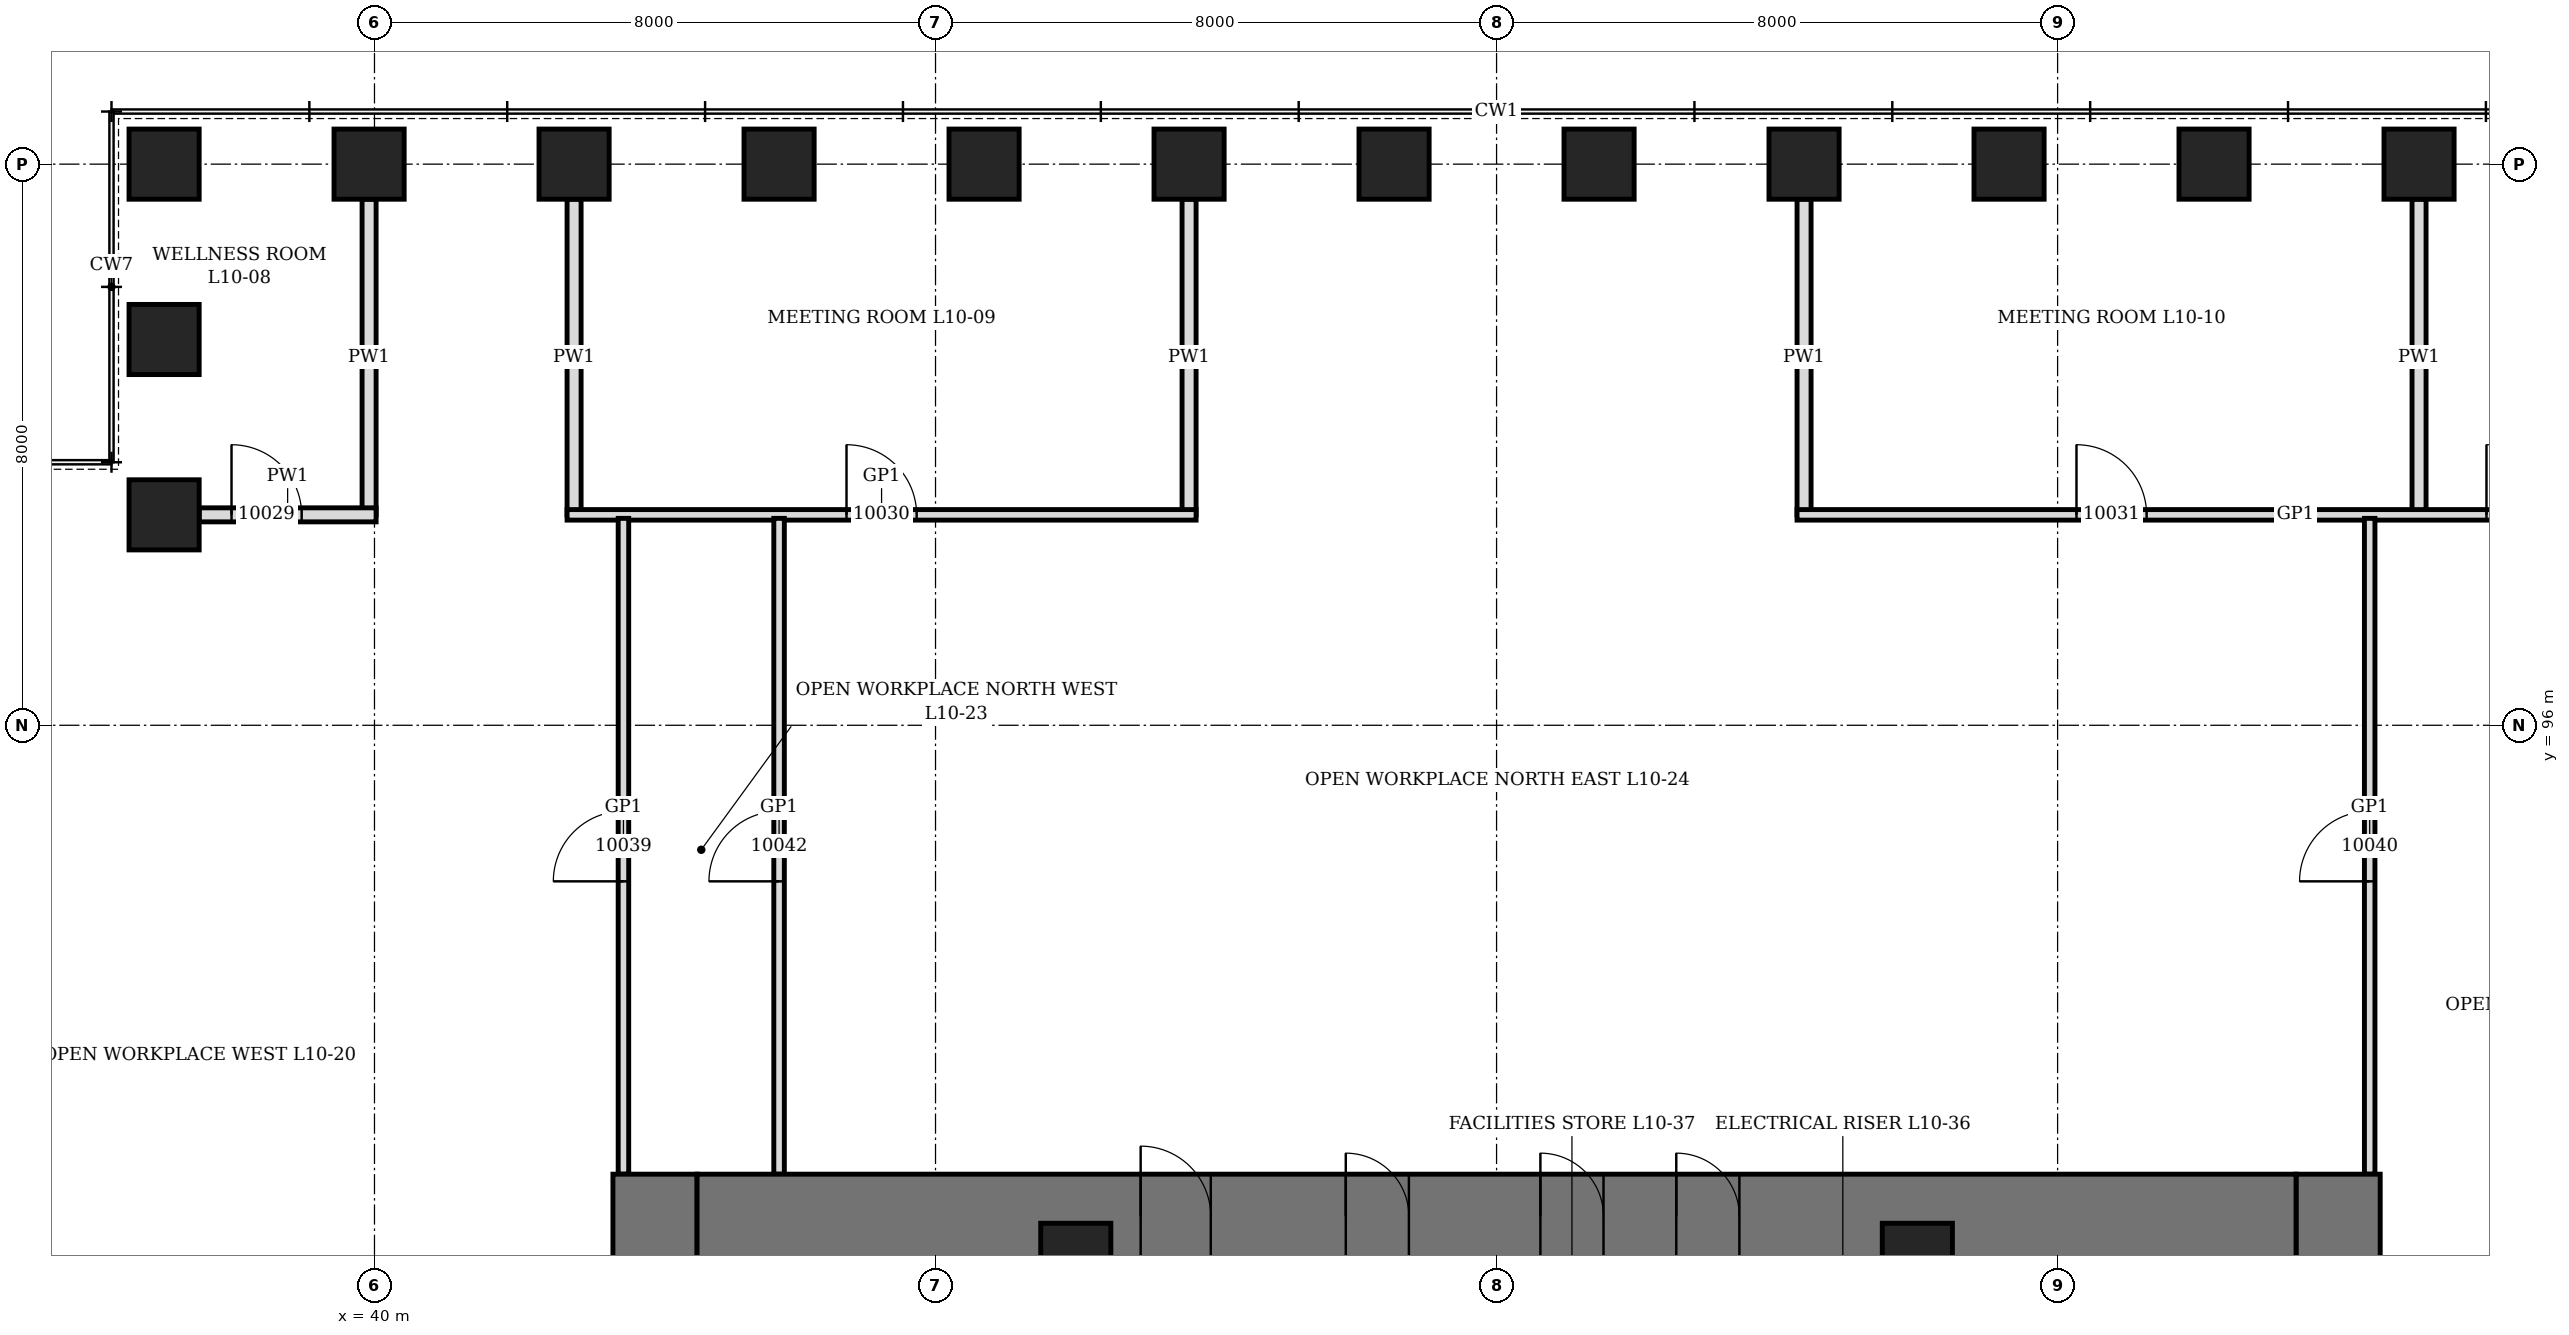
"""IFC4 building model, lengths in metres.
Left out: names, types, materials, properties, quantities, classifications, styles, units other than length and angle.
Written with IfcOpenShell. Run it as: python <this file> out.ifc"""

import sys

from ifc_helpers import new_model, si_unit, direction, frame, frame_2d, origin, origin_2d, place, context, subcontext, project, spatial, rectangle, hollow_rectangle, extrude, element, fill, save


model = new_model("IFC4")
c1 = context("Model", 3, precision=1e-05, world=origin(), true_north=direction((0.0, 1.0)))
c2 = subcontext(c1, "Body", "Model", "MODEL_VIEW")
j1 = project(units=[si_unit("LENGTHUNIT", "METRE"), si_unit("PLANEANGLEUNIT", "RADIAN")], contexts=[c1])
p1 = place(None, origin())
s1 = spatial("IfcSite", under=j1, at=p1, CompositionType="ELEMENT")
p2 = place(p1, origin())
s2 = spatial("IfcBuilding", under=s1, at=p2, CompositionType="ELEMENT")
p3 = place(p2, frame((0.0, 0.0, 51.7)))
s3 = spatial("IfcBuildingStorey", under=s2, at=p3, CompositionType="ELEMENT", Elevation=51.7)
for number, where, z_axis, x_axis in (
    (1, (69.154, 104.0, 0.0), (0.0, 0.0, 1.0), (1.0, 0.0, 0.0)),
    (2, (66.231, 104.0, 0.0), (0.0, 0.0, 1.0), (1.0, 0.0, 0.0)),
    (3, (63.308, 104.0, 0.0), (0.0, 0.0, 1.0), (1.0, 0.0, 0.0)),
    (4, (60.385, 104.0, 0.0), (0.0, 0.0, 1.0), (1.0, 0.0, 0.0)),
    (5, (57.461, 104.0, 0.0), (0.0, 0.0, 1.0), (1.0, 0.0, 0.0)),
    (6, (54.539, 104.0, 0.0), (0.0, 0.0, 1.0), (1.0, 0.0, 0.0)),
    (7, (51.615, 104.0, 0.0), (0.0, 0.0, 1.0), (1.0, 0.0, 0.0)),
    (8, (48.692, 104.0, 0.0), (0.0, 0.0, 1.0), (1.0, 0.0, 0.0)),
    (9, (45.769, 104.0, 0.0), (0.0, 0.0, 1.0), (1.0, 0.0, 0.0)),
    (10, (42.846, 104.0, 0.0), (0.0, 0.0, 1.0), (1.0, 0.0, 0.0)),
    (11, (39.923, 104.0, 0.0), (0.0, 0.0, 1.0), (1.0, 0.0, 0.0)),
    (12, (37.0, 104.0, 0.0), (0.0, 0.0, 1.0), (0.0, 1.0, 0.0)),
    (13, (37.0, 101.5, 0.0), (0.0, 0.0, 1.0), (0.0, 1.0, 0.0)),
    (14, (37.0, 99.0, 0.0), (0.0, 0.0, 1.0), (1.0, 0.0, 0.0)),
):
    element("IfcColumn", number, at=place(p3, frame(where, z_axis=z_axis, x_axis=x_axis)), inside=s3, PredefinedType="COLUMN", context=c2, shape_type="SweptSolid", body=[
        extrude(hollow_rectangle(XDim=1.0, YDim=1.0, WallThickness=0.25, at=origin_2d()), origin(), (0.0, 0.0, 1.0), 4.2),
    ])
p4 = place(p3, frame((44.0, 70.4, 0.0), z_axis=(0.0, 0.0, 1.0), x_axis=(0.0, 1.0, 0.0)))
e15 = element("IfcWall", 15, at=p4, inside=s3, PredefinedType="SHEAR", context=c2, shape_type="SweptSolid", body=[
    extrude(rectangle(XDim=19.2, YDim=1.2, at=frame_2d((9.6, 0.0))), origin(), (0.0, 0.0, 1.0), 4.2),
])
p5 = place(p4, frame((8.6, 0.0, 0.0)))
e16 = element("IfcOpeningElement", 16, at=p5, cuts=e15, PredefinedType="OPENING", context=c2, shape_type="SweptSolid", body=[
    extrude(rectangle(XDim=2.0, YDim=2.4, at=frame_2d((1.0, 1.2))), frame((0.0, 0.61, 0.0), z_axis=(0.0, -1.0, 0.0), x_axis=(1.0, 0.0, 0.0)), (0.0, 0.0, 1.0), 1.22),
])
p6 = place(p3, frame((68.0, 70.4, 0.0), z_axis=(0.0, 0.0, 1.0), x_axis=(0.0, 1.0, 0.0)))
e17 = element("IfcWall", 17, at=p6, inside=s3, PredefinedType="SHEAR", context=c2, shape_type="SweptSolid", body=[
    extrude(rectangle(XDim=19.2, YDim=1.2, at=frame_2d((9.6, 0.0))), origin(), (0.0, 0.0, 1.0), 4.2),
])
p7 = place(p6, frame((8.6, 0.0, 0.0)))
e18 = element("IfcOpeningElement", 18, at=p7, cuts=e17, PredefinedType="OPENING", context=c2, shape_type="SweptSolid", body=[
    extrude(rectangle(XDim=2.0, YDim=2.4, at=frame_2d((1.0, 1.2))), frame((0.0, 0.61, 0.0), z_axis=(0.0, -1.0, 0.0), x_axis=(1.0, 0.0, 0.0)), (0.0, 0.0, 1.0), 1.22),
])
p8 = place(p3, frame((44.6, 89.0, 0.0), z_axis=(0.0, 0.0, 1.0), x_axis=(1.0, 0.0, 0.0)))
e19 = element("IfcWall", 19, at=p8, inside=s3, PredefinedType="SHEAR", context=c2, shape_type="SweptSolid", body=[
    extrude(rectangle(XDim=22.8, YDim=1.2, at=frame_2d((11.4, 0.0))), origin(), (0.0, 0.0, 1.0), 4.2),
])
p9 = place(p8, frame((6.325, 0.0, 0.0)))
e20 = element("IfcOpeningElement", 20, at=p9, cuts=e19, PredefinedType="OPENING", context=c2, shape_type="SweptSolid", body=[
    extrude(rectangle(XDim=1.0, YDim=2.1, at=frame_2d((0.5, 1.05))), frame((0.0, 0.61, 0.0), z_axis=(0.0, -1.0, 0.0), x_axis=(1.0, 0.0, 0.0)), (0.0, 0.0, 1.0), 1.22),
])
p10 = place(p8, frame((9.25, 0.0, 0.0)))
e21 = element("IfcOpeningElement", 21, at=p10, cuts=e19, PredefinedType="OPENING", context=c2, shape_type="SweptSolid", body=[
    extrude(rectangle(XDim=0.9, YDim=2.1, at=frame_2d((0.45, 1.05))), frame((0.0, 0.61, 0.0), z_axis=(0.0, -1.0, 0.0), x_axis=(1.0, 0.0, 0.0)), (0.0, 0.0, 1.0), 1.22),
])
p11 = place(p8, frame((12.025, 0.0, 0.0)))
e22 = element("IfcOpeningElement", 22, at=p11, cuts=e19, PredefinedType="OPENING", context=c2, shape_type="SweptSolid", body=[
    extrude(rectangle(XDim=0.9, YDim=2.1, at=frame_2d((0.45, 1.05))), frame((0.0, 0.61, 0.0), z_axis=(0.0, -1.0, 0.0), x_axis=(1.0, 0.0, 0.0)), (0.0, 0.0, 1.0), 1.22),
])
p12 = place(p8, frame((13.962, 0.0, 0.0)))
e23 = element("IfcOpeningElement", 23, at=p12, cuts=e19, PredefinedType="OPENING", context=c2, shape_type="SweptSolid", body=[
    extrude(rectangle(XDim=0.9, YDim=2.1, at=frame_2d((0.45, 1.05))), frame((0.0, 0.61, 0.0), z_axis=(0.0, -1.0, 0.0), x_axis=(1.0, 0.0, 0.0)), (0.0, 0.0, 1.0), 1.22),
])
for number, where, z_axis, x_axis in (
    (24, (50.0, 88.4, 0.0), (0.0, 0.0, 1.0), (1.0, 0.0, 0.0)),
    (25, (62.0, 88.4, 0.0), (0.0, 0.0, 1.0), (1.0, 0.0, 0.0)),
):
    element("IfcColumn", number, at=place(p3, frame(where, z_axis=z_axis, x_axis=x_axis)), inside=s3, PredefinedType="COLUMN", context=c2, shape_type="SweptSolid", body=[
        extrude(hollow_rectangle(XDim=1.0, YDim=1.0, WallThickness=0.15, at=origin_2d()), origin(), (0.0, 0.0, 1.0), 4.2),
    ])
p13 = place(p3, frame((39.923, 99.0, 0.0), z_axis=(0.0, 0.0, 1.0), x_axis=(0.0, 1.0, 0.0)))
e26 = element("IfcWall", 26, at=p13, inside=s3, PredefinedType="PARTITIONING", context=c2, shape_type="SweptSolid", body=[
    extrude(rectangle(XDim=4.5, YDim=0.2, at=frame_2d((2.25, 0.0))), origin(), (0.0, 0.0, 1.0), 3.428),
])
for number, where, z_axis, x_axis in (
    (27, (42.846, 99.0, 0.0), (0.0, 0.0, 1.0), (0.0, 1.0, 0.0)),
    (28, (51.615, 99.0, 0.0), (0.0, 0.0, 1.0), (0.0, 1.0, 0.0)),
    (29, (60.385, 99.0, 0.0), (0.0, 0.0, 1.0), (0.0, 1.0, 0.0)),
    (30, (69.154, 99.0, 0.0), (0.0, 0.0, 1.0), (0.0, 1.0, 0.0)),
):
    element("IfcWall", number, at=place(p3, frame(where, z_axis=z_axis, x_axis=x_axis)), inside=s3, PredefinedType="PARTITIONING", context=c2, shape_type="SweptSolid", body=[
        extrude(rectangle(XDim=4.5, YDim=0.2, at=frame_2d((2.25, 0.0))), origin(), (0.0, 0.0, 1.0), 3.278),
    ])
p14 = place(p3, frame((42.746, 99.0, 0.0), z_axis=(0.0, 0.0, 1.0), x_axis=(1.0, 0.0, 0.0)))
e31 = element("IfcWall", 31, at=p14, inside=s3, PredefinedType="PARTITIONING", context=c2, shape_type="SweptSolid", body=[
    extrude(rectangle(XDim=8.969, YDim=0.15, at=frame_2d((4.485, 0.0))), origin(), (0.0, 0.0, 1.0), 4.04),
])
p15 = place(p14, frame((3.985, 0.0, 0.0)))
e32 = element("IfcOpeningElement", 32, at=p15, cuts=e31, PredefinedType="OPENING", context=c2, shape_type="SweptSolid", body=[
    extrude(rectangle(XDim=1.0, YDim=2.4, at=frame_2d((0.5, 1.2))), frame((0.0, 0.085, 0.0), z_axis=(0.0, -1.0, 0.0), x_axis=(1.0, 0.0, 0.0)), (0.0, 0.0, 1.0), 0.17),
])
p16 = place(p3, frame((60.285, 99.0, 0.0), z_axis=(0.0, 0.0, 1.0), x_axis=(1.0, 0.0, 0.0)))
e33 = element("IfcWall", 33, at=p16, inside=s3, PredefinedType="PARTITIONING", context=c2, shape_type="SweptSolid", body=[
    extrude(rectangle(XDim=14.215, YDim=0.15, at=frame_2d((7.108, 0.0))), origin(), (0.0, 0.0, 1.0), 4.04),
])
p17 = place(p16, frame((3.985, 0.0, 0.0)))
e34 = element("IfcOpeningElement", 34, at=p17, cuts=e33, PredefinedType="OPENING", context=c2, shape_type="SweptSolid", body=[
    extrude(rectangle(XDim=1.0, YDim=2.4, at=frame_2d((0.5, 1.2))), frame((0.0, 0.085, 0.0), z_axis=(0.0, -1.0, 0.0), x_axis=(1.0, 0.0, 0.0)), (0.0, 0.0, 1.0), 0.17),
])
p18 = place(p16, frame((9.831, 0.0, 0.0)))
e35 = element("IfcOpeningElement", 35, at=p18, cuts=e33, PredefinedType="OPENING", context=c2, shape_type="SweptSolid", body=[
    extrude(rectangle(XDim=1.0, YDim=2.4, at=frame_2d((0.5, 1.2))), frame((0.0, 0.085, 0.0), z_axis=(0.0, -1.0, 0.0), x_axis=(1.0, 0.0, 0.0)), (0.0, 0.0, 1.0), 0.17),
])
p19 = place(p3, frame((37.5, 99.0, 0.0), z_axis=(0.0, 0.0, 1.0), x_axis=(1.0, 0.0, 0.0)))
e36 = element("IfcWall", 36, at=p19, inside=s3, PredefinedType="PARTITIONING", context=c2, shape_type="SweptSolid", body=[
    extrude(rectangle(XDim=2.523, YDim=0.2, at=frame_2d((1.262, 0.0))), origin(), (0.0, 0.0, 1.0), 4.04),
])
p20 = place(p19, frame((0.461, 0.0, 0.0)))
e37 = element("IfcOpeningElement", 37, at=p20, cuts=e36, PredefinedType="OPENING", context=c2, shape_type="SweptSolid", body=[
    extrude(rectangle(XDim=1.0, YDim=2.1, at=frame_2d((0.5, 1.05))), frame((0.0, 0.11, 0.0), z_axis=(0.0, -1.0, 0.0), x_axis=(1.0, 0.0, 0.0)), (0.0, 0.0, 1.0), 0.22),
])
p21 = place(p3, frame((43.55, 89.6, 0.0), z_axis=(0.0, 0.0, 1.0), x_axis=(0.0, 1.0, 0.0)))
e38 = element("IfcWall", 38, at=p21, inside=s3, PredefinedType="PARTITIONING", context=c2, shape_type="SweptSolid", body=[
    extrude(rectangle(XDim=9.35, YDim=0.15, at=frame_2d((4.675, 0.0))), origin(), (0.0, 0.0, 1.0), 4.04),
])
p22 = place(p21, frame((4.175, 0.0, 0.0)))
e39 = element("IfcOpeningElement", 39, at=p22, cuts=e38, PredefinedType="OPENING", context=c2, shape_type="SweptSolid", body=[
    extrude(rectangle(XDim=1.0, YDim=2.4, at=frame_2d((0.5, 1.2))), frame((0.0, 0.085, 0.0), z_axis=(0.0, -1.0, 0.0), x_axis=(1.0, 0.0, 0.0)), (0.0, 0.0, 1.0), 0.17),
])
p23 = place(p3, frame((45.769, 89.6, 0.0), z_axis=(0.0, 0.0, 1.0), x_axis=(0.0, 1.0, 0.0)))
e40 = element("IfcWall", 40, at=p23, inside=s3, PredefinedType="PARTITIONING", context=c2, shape_type="SweptSolid", body=[
    extrude(rectangle(XDim=9.35, YDim=0.15, at=frame_2d((4.675, 0.0))), origin(), (0.0, 0.0, 1.0), 3.278),
])
p24 = place(p23, frame((4.175, 0.0, 0.0)))
e41 = element("IfcOpeningElement", 41, at=p24, cuts=e40, PredefinedType="OPENING", context=c2, shape_type="SweptSolid", body=[
    extrude(rectangle(XDim=1.0, YDim=2.4, at=frame_2d((0.5, 1.2))), frame((0.0, 0.085, 0.0), z_axis=(0.0, -1.0, 0.0), x_axis=(1.0, 0.0, 0.0)), (0.0, 0.0, 1.0), 0.17),
])
p25 = place(p3, frame((68.45, 89.6, 0.0), z_axis=(0.0, 0.0, 1.0), x_axis=(0.0, 1.0, 0.0)))
e42 = element("IfcWall", 42, at=p25, inside=s3, PredefinedType="PARTITIONING", context=c2, shape_type="SweptSolid", body=[
    extrude(rectangle(XDim=9.35, YDim=0.15, at=frame_2d((4.675, 0.0))), origin(), (0.0, 0.0, 1.0), 4.04),
])
p26 = place(p25, frame((4.175, 0.0, 0.0)))
e43 = element("IfcOpeningElement", 43, at=p26, cuts=e42, PredefinedType="OPENING", context=c2, shape_type="SweptSolid", body=[
    extrude(rectangle(XDim=1.0, YDim=2.4, at=frame_2d((0.5, 1.2))), frame((0.0, 0.085, 0.0), z_axis=(0.0, -1.0, 0.0), x_axis=(1.0, 0.0, 0.0)), (0.0, 0.0, 1.0), 0.17),
])
p27 = place(p9, origin())
e44 = element("IfcDoor", 44, at=p27, inside=s3, OperationType="SINGLE_SWING_LEFT", PredefinedType="DOOR", context=c2, shape_type="SweptSolid", body=[
    extrude(rectangle(XDim=1.0, YDim=2.1, at=frame_2d((0.5, 1.05))), frame((0.0, 0.35, 0.0), z_axis=(0.0, -1.0, 0.0), x_axis=(1.0, 0.0, 0.0)), (0.0, 0.0, 1.0), 0.7),
])
fill(e20, e44)
p28 = place(p10, origin())
e45 = element("IfcDoor", 45, at=p28, inside=s3, OperationType="SINGLE_SWING_LEFT", PredefinedType="DOOR", context=c2, shape_type="SweptSolid", body=[
    extrude(rectangle(XDim=0.9, YDim=2.1, at=frame_2d((0.45, 1.05))), frame((0.0, 0.35, 0.0), z_axis=(0.0, -1.0, 0.0), x_axis=(1.0, 0.0, 0.0)), (0.0, 0.0, 1.0), 0.7),
])
fill(e21, e45)
p29 = place(p11, origin())
e46 = element("IfcDoor", 46, at=p29, inside=s3, OperationType="SINGLE_SWING_LEFT", PredefinedType="DOOR", context=c2, shape_type="SweptSolid", body=[
    extrude(rectangle(XDim=0.9, YDim=2.1, at=frame_2d((0.45, 1.05))), frame((0.0, 0.35, 0.0), z_axis=(0.0, -1.0, 0.0), x_axis=(1.0, 0.0, 0.0)), (0.0, 0.0, 1.0), 0.7),
])
fill(e22, e46)
p30 = place(p12, origin())
e47 = element("IfcDoor", 47, at=p30, inside=s3, OperationType="SINGLE_SWING_LEFT", PredefinedType="DOOR", context=c2, shape_type="SweptSolid", body=[
    extrude(rectangle(XDim=0.9, YDim=2.1, at=frame_2d((0.45, 1.05))), frame((0.0, 0.35, 0.0), z_axis=(0.0, -1.0, 0.0), x_axis=(1.0, 0.0, 0.0)), (0.0, 0.0, 1.0), 0.7),
])
fill(e23, e47)
p31 = place(p20, origin())
e48 = element("IfcDoor", 48, at=p31, inside=s3, OperationType="SINGLE_SWING_LEFT", PredefinedType="DOOR", context=c2, shape_type="SweptSolid", body=[
    extrude(rectangle(XDim=1.0, YDim=2.1, at=frame_2d((0.5, 1.05))), frame((0.0, 0.1, 0.0), z_axis=(0.0, -1.0, 0.0), x_axis=(1.0, 0.0, 0.0)), (0.0, 0.0, 1.0), 0.199),
])
fill(e37, e48)
p32 = place(p15, origin())
e49 = element("IfcDoor", 49, at=p32, inside=s3, OperationType="SINGLE_SWING_RIGHT", PredefinedType="DOOR", context=c2, shape_type="SweptSolid", body=[
    extrude(rectangle(XDim=1.0, YDim=2.4, at=frame_2d((0.5, 1.2))), frame((0.0, 0.075, 0.0), z_axis=(0.0, -1.0, 0.0), x_axis=(1.0, 0.0, 0.0)), (0.0, 0.0, 1.0), 0.149),
])
fill(e32, e49)
p33 = place(p17, origin())
e50 = element("IfcDoor", 50, at=p33, inside=s3, OperationType="SINGLE_SWING_RIGHT", PredefinedType="DOOR", context=c2, shape_type="SweptSolid", body=[
    extrude(rectangle(XDim=1.0, YDim=2.4, at=frame_2d((0.5, 1.2))), frame((0.0, 0.075, 0.0), z_axis=(0.0, -1.0, 0.0), x_axis=(1.0, 0.0, 0.0)), (0.0, 0.0, 1.0), 0.149),
])
fill(e34, e50)
p34 = place(p18, origin())
e51 = element("IfcDoor", 51, at=p34, inside=s3, OperationType="SINGLE_SWING_RIGHT", PredefinedType="DOOR", context=c2, shape_type="SweptSolid", body=[
    extrude(rectangle(XDim=1.0, YDim=2.4, at=frame_2d((0.5, 1.2))), frame((0.0, 0.075, 0.0), z_axis=(0.0, -1.0, 0.0), x_axis=(1.0, 0.0, 0.0)), (0.0, 0.0, 1.0), 0.149),
])
fill(e35, e51)
p35 = place(p22, origin())
e52 = element("IfcDoor", 52, at=p35, inside=s3, OperationType="SINGLE_SWING_RIGHT", PredefinedType="DOOR", context=c2, shape_type="SweptSolid", body=[
    extrude(rectangle(XDim=1.0, YDim=2.4, at=frame_2d((0.5, 1.2))), frame((0.0, 0.075, 0.0), z_axis=(0.0, -1.0, 0.0), x_axis=(1.0, 0.0, 0.0)), (0.0, 0.0, 1.0), 0.149),
])
fill(e39, e52)
p36 = place(p26, origin())
e53 = element("IfcDoor", 53, at=p36, inside=s3, OperationType="SINGLE_SWING_RIGHT", PredefinedType="DOOR", context=c2, shape_type="SweptSolid", body=[
    extrude(rectangle(XDim=1.0, YDim=2.4, at=frame_2d((0.5, 1.2))), frame((0.0, 0.075, 0.0), z_axis=(0.0, -1.0, 0.0), x_axis=(1.0, 0.0, 0.0)), (0.0, 0.0, 1.0), 0.149),
])
fill(e43, e53)
p37 = place(p24, origin())
e54 = element("IfcDoor", 54, at=p37, inside=s3, OperationType="SINGLE_SWING_RIGHT", PredefinedType="DOOR", context=c2, shape_type="SweptSolid", body=[
    extrude(rectangle(XDim=1.0, YDim=2.4, at=frame_2d((0.5, 1.2))), frame((0.0, 0.075, 0.0), z_axis=(0.0, -1.0, 0.0), x_axis=(1.0, 0.0, 0.0)), (0.0, 0.0, 1.0), 0.149),
])
fill(e41, e54)
save(model, sys.argv[1])
